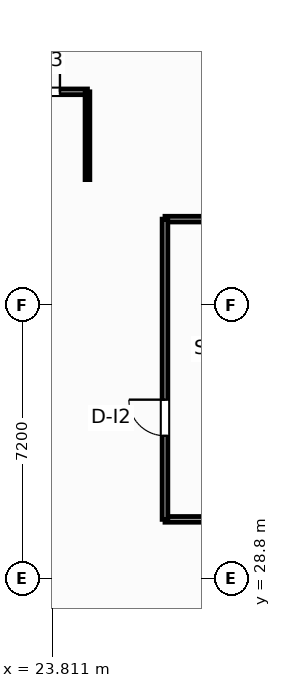
"""IFC4 building model, lengths in metres.
Left out: names, types, materials, properties, quantities, classifications, styles, units other than length and angle.
Written with IfcOpenShell. Run it as: python <this file> out.ifc"""

import sys

from ifc_helpers import new_model, si_unit, direction, frame, frame_2d, origin, place, context, subcontext, project, spatial, rectangle, extrude, element, fill, save


model = new_model("IFC4")
c1 = context("Model", 3, precision=1e-05, world=origin(), true_north=direction((0.0, 1.0)))
c2 = subcontext(c1, "Body", "Model", "MODEL_VIEW")
j1 = project(units=[si_unit("LENGTHUNIT", "METRE"), si_unit("PLANEANGLEUNIT", "RADIAN")], contexts=[c1])
p1 = place(None, origin())
s1 = spatial("IfcSite", under=j1, at=p1, CompositionType="ELEMENT")
p2 = place(p1, origin())
s2 = spatial("IfcBuilding", under=s1, at=p2, CompositionType="ELEMENT")
p3 = place(p2, frame((0.0, 0.0, 147.6)))
s3 = spatial("IfcBuildingStorey", under=s2, at=p3, CompositionType="ELEMENT", Elevation=147.6)
p4 = place(p3, frame((5.0, 41.61, 0.0), z_axis=(0.0, 0.0, 1.0), x_axis=(1.0, 0.0, 0.0)))
e1 = element("IfcWall", 1, at=p4, inside=s3, PredefinedType="PARTITIONING", context=c2, shape_type="SweptSolid", body=[
    extrude(rectangle(XDim=19.74, YDim=0.15, at=frame_2d((9.87, 0.0))), origin(), (0.0, 0.0, 1.0), 3.45),
])
p5 = place(p4, frame((18.096, 0.0, 0.0)))
e2 = element("IfcOpeningElement", 2, at=p5, cuts=e1, PredefinedType="OPENING", context=c2, shape_type="SweptSolid", body=[
    extrude(rectangle(XDim=0.92, YDim=2.05, at=frame_2d((0.46, 1.025))), frame((0.0, 0.085, 0.0), z_axis=(0.0, -1.0, 0.0), x_axis=(1.0, 0.0, 0.0)), (0.0, 0.0, 1.0), 0.17),
])
p6 = place(p3, frame((24.74, 39.3, 0.0), z_axis=(0.0, 0.0, 1.0), x_axis=(0.0, 1.0, 0.0)))
e3 = element("IfcWall", 3, at=p6, inside=s3, PredefinedType="PARTITIONING", context=c2, shape_type="SweptSolid", body=[
    extrude(rectangle(XDim=2.31, YDim=0.125, at=frame_2d((1.155, 0.0))), origin(), (0.0, 0.0, 1.0), 3.45),
])
for number, where, z_axis, x_axis in (
    (4, (26.78, 30.36, 0.0), (0.0, 0.0, 1.0), (1.0, 0.0, 0.0)),
    (5, (26.78, 38.26, 0.0), (0.0, 0.0, 1.0), (1.0, 0.0, 0.0)),
):
    element("IfcWall", number, at=place(p3, frame(where, z_axis=z_axis, x_axis=x_axis)), inside=s3, PredefinedType="PARTITIONING", context=c2, shape_type="SweptSolid", body=[
        extrude(rectangle(XDim=3.9, YDim=0.15, at=frame_2d((1.95, 0.0))), origin(), (0.0, 0.0, 1.0), 3.45),
    ])
p7 = place(p3, frame((26.78, 30.36, 0.0), z_axis=(0.0, 0.0, 1.0), x_axis=(0.0, 1.0, 0.0)))
e6 = element("IfcWall", 6, at=p7, inside=s3, PredefinedType="PARTITIONING", context=c2, shape_type="SweptSolid", body=[
    extrude(rectangle(XDim=7.9, YDim=0.15, at=frame_2d((3.95, 0.0))), origin(), (0.0, 0.0, 1.0), 3.45),
])
p8 = place(p7, frame((2.2, 0.0, 0.0)))
e7 = element("IfcOpeningElement", 7, at=p8, cuts=e6, PredefinedType="OPENING", context=c2, shape_type="SweptSolid", body=[
    extrude(rectangle(XDim=0.95, YDim=2.05, at=frame_2d((0.475, 1.025))), frame((0.0, 0.085, 0.0), z_axis=(0.0, -1.0, 0.0), x_axis=(1.0, 0.0, 0.0)), (0.0, 0.0, 1.0), 0.17),
])
p9 = place(p5, origin())
e8 = element("IfcDoor", 8, at=p9, inside=s3, OperationType="SINGLE_SWING_RIGHT", PredefinedType="DOOR", context=c2, shape_type="SweptSolid", body=[
    extrude(rectangle(XDim=0.92, YDim=2.05, at=frame_2d((0.46, 1.025))), frame((0.0, 0.025, 0.0), z_axis=(0.0, -1.0, 0.0), x_axis=(1.0, 0.0, 0.0)), (0.0, 0.0, 1.0), 0.05),
])
fill(e2, e8)
p10 = place(p8, origin())
e9 = element("IfcDoor", 9, at=p10, inside=s3, OperationType="SINGLE_SWING_RIGHT", PredefinedType="DOOR", context=c2, shape_type="SweptSolid", body=[
    extrude(rectangle(XDim=0.95, YDim=2.05, at=frame_2d((0.475, 1.025))), frame((0.0, 0.025, 0.0), z_axis=(0.0, -1.0, 0.0), x_axis=(1.0, 0.0, 0.0)), (0.0, 0.0, 1.0), 0.05),
])
fill(e7, e9)
save(model, sys.argv[1])
